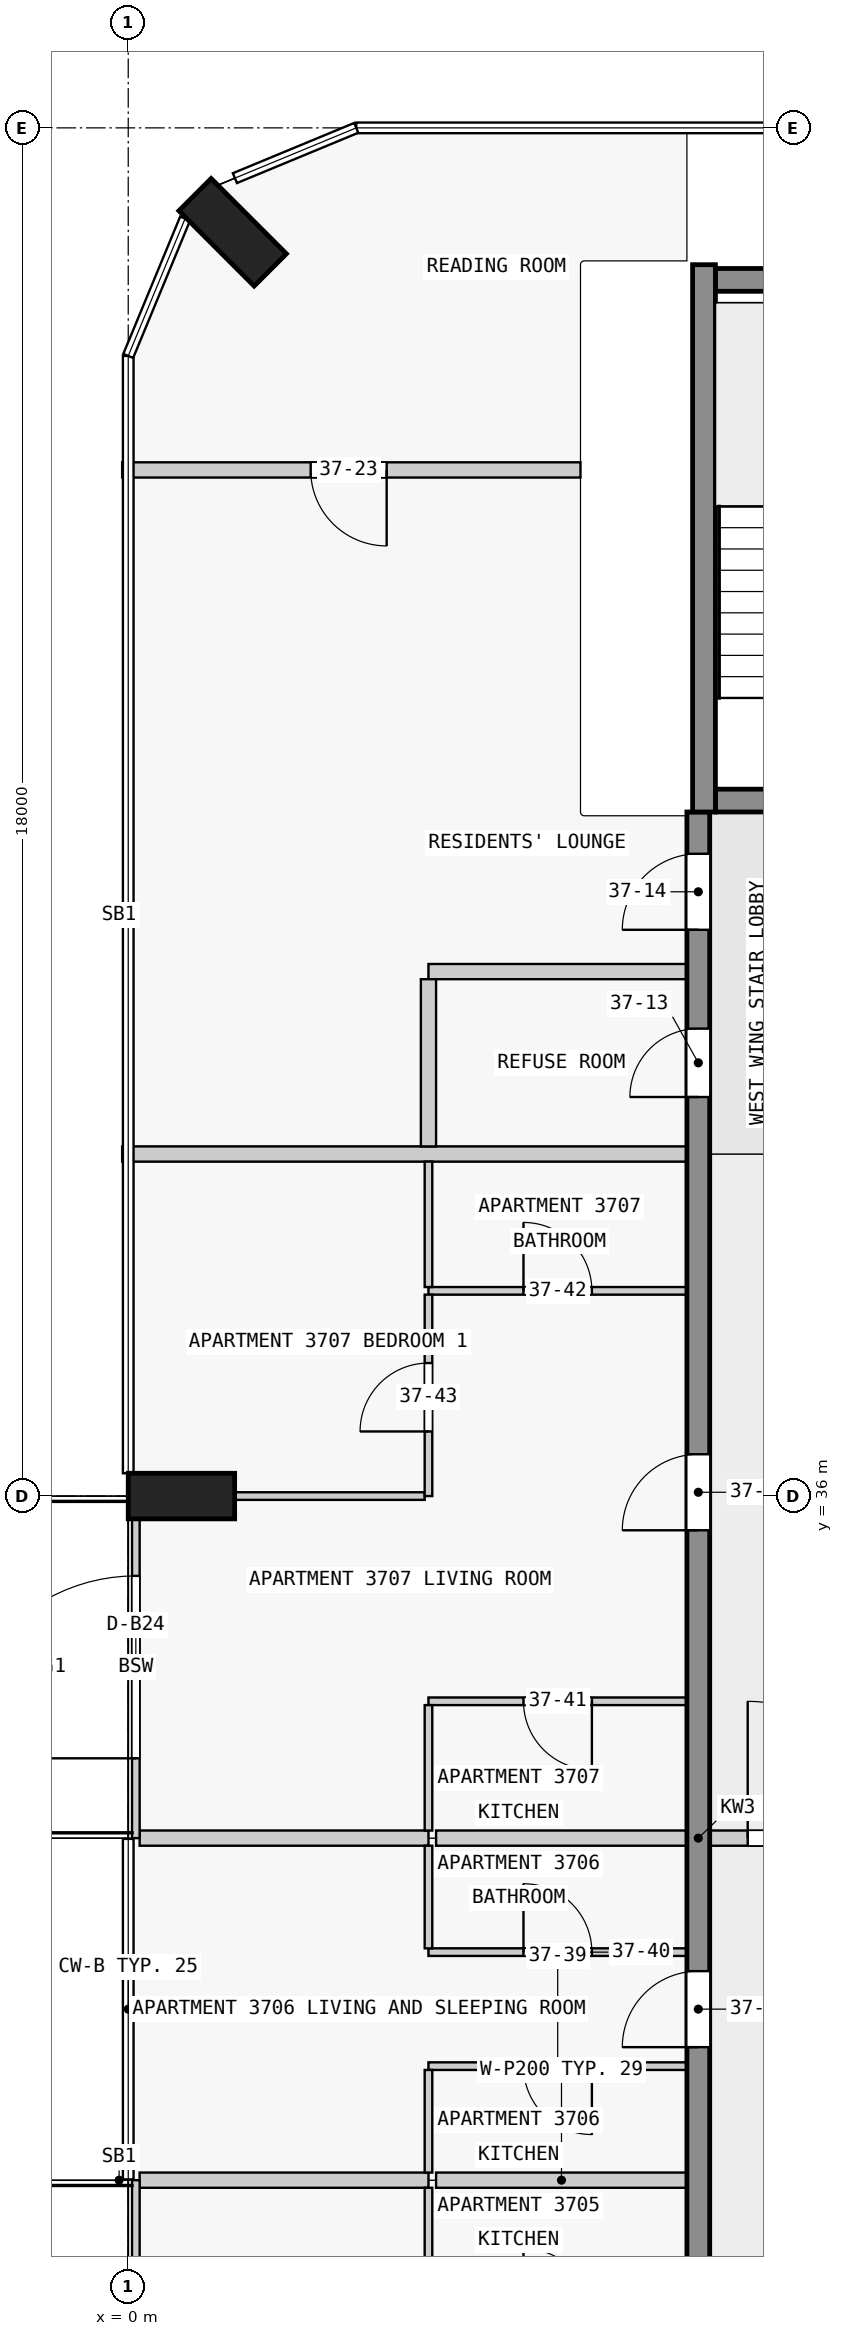
"""IFC4 building model, lengths in metres.
Left out: names, types, materials, properties, quantities, classifications, styles, units other than length and angle.
Written with IfcOpenShell. Run it as: python <this file> out.ifc"""

import sys

from ifc_helpers import new_model, si_unit, direction, frame, frame_2d, origin, origin_2d, place, context, subcontext, project, spatial, rectangle, extrude, element, fill, save


model = new_model("IFC4")
c1 = context("Model", 3, precision=1e-05, world=origin(), true_north=direction((0.0, 1.0)))
c2 = subcontext(c1, "Body", "Model", "MODEL_VIEW")
j1 = project(units=[si_unit("LENGTHUNIT", "METRE"), si_unit("PLANEANGLEUNIT", "RADIAN")], contexts=[c1])
p1 = place(None, origin())
s1 = spatial("IfcSite", under=j1, at=p1, CompositionType="ELEMENT")
p2 = place(p1, origin())
s2 = spatial("IfcBuilding", under=s1, at=p2, CompositionType="ELEMENT")
p3 = place(p2, frame((0.0, 0.0, 146.4)))
s3 = spatial("IfcBuildingStorey", under=s2, at=p3, CompositionType="ELEMENT", Elevation=146.4)
for number, where, z_axis, x_axis in (
    (1, (1.374, 52.626, 0.0), (0.0, 0.0, 1.0), (0.707, 0.707, 0.0)),
    (2, (0.7, 36.0, 0.0), (0.0, 0.0, 1.0), (0.0, 1.0, 0.0)),
):
    element("IfcColumn", number, at=place(p3, frame(where, z_axis=z_axis, x_axis=x_axis)), inside=s3, PredefinedType="COLUMN", context=c2, shape_type="SweptSolid", body=[
        extrude(rectangle(XDim=0.6, YDim=1.4, at=origin_2d()), origin(), (0.0, 0.0, 1.0), 3.5),
    ])
p4 = place(p3, frame((7.725, 45.15, 0.0), z_axis=(0.0, 0.0, 1.0), x_axis=(1.0, 0.0, 0.0)))
e3 = element("IfcWall", 3, at=p4, inside=s3, PredefinedType="SHEAR", context=c2, shape_type="SweptSolid", body=[
    extrude(rectangle(XDim=2.55, YDim=0.3, at=frame_2d((1.275, 0.0))), origin(), (0.0, 0.0, 1.0), 3.5),
])
p5 = place(p4, frame((0.725, 0.0, 0.0)))
e4 = element("IfcOpeningElement", 4, at=p5, cuts=e3, PredefinedType="OPENING", context=c2, shape_type="SweptSolid", body=[
    extrude(rectangle(XDim=1.1, YDim=2.1, at=frame_2d((0.55, 1.05))), frame((0.0, 0.16, 0.0), z_axis=(0.0, -1.0, 0.0), x_axis=(1.0, 0.0, 0.0)), (0.0, 0.0, 1.0), 0.32),
])
p6 = place(p3, frame((7.725, 52.0, 0.0), z_axis=(0.0, 0.0, 1.0), x_axis=(1.0, 0.0, 0.0)))
e5 = element("IfcWall", 5, at=p6, inside=s3, PredefinedType="SHEAR", context=c2, shape_type="SweptSolid", body=[
    extrude(rectangle(XDim=2.55, YDim=0.3, at=frame_2d((1.275, 0.0))), origin(), (0.0, 0.0, 1.0), 3.5),
])
p7 = place(p3, frame((7.575, 45.0, 0.0), z_axis=(0.0, 0.0, 1.0), x_axis=(0.0, 1.0, 0.0)))
e6 = element("IfcWall", 6, at=p7, inside=s3, PredefinedType="SHEAR", context=c2, shape_type="SweptSolid", body=[
    extrude(rectangle(XDim=7.2, YDim=0.3, at=frame_2d((3.6, 0.0))), origin(), (0.0, 0.0, 1.0), 3.5),
])
p8 = place(p3, frame((7.5, 18.0, 0.0), z_axis=(0.0, 0.0, 1.0), x_axis=(0.0, 1.0, 0.0)))
e7 = element("IfcWall", 7, at=p8, inside=s3, PredefinedType="SHEAR", context=c2, shape_type="SweptSolid", body=[
    extrude(rectangle(XDim=27.0, YDim=0.3, at=frame_2d((13.5, 0.0))), origin(), (0.0, 0.0, 1.0), 3.25),
])
p9 = place(p8, frame((4.05, 0.0, 0.0)))
e8 = element("IfcOpeningElement", 8, at=p9, cuts=e7, PredefinedType="OPENING", context=c2, shape_type="SweptSolid", body=[
    extrude(rectangle(XDim=1.0, YDim=2.1, at=frame_2d((0.5, 1.05))), frame((0.0, 0.16, 0.0), z_axis=(0.0, -1.0, 0.0), x_axis=(1.0, 0.0, 0.0)), (0.0, 0.0, 1.0), 0.32),
])
p10 = place(p8, frame((10.75, 0.0, 0.0)))
e9 = element("IfcOpeningElement", 9, at=p10, cuts=e7, PredefinedType="OPENING", context=c2, shape_type="SweptSolid", body=[
    extrude(rectangle(XDim=1.0, YDim=2.1, at=frame_2d((0.5, 1.05))), frame((0.0, 0.16, 0.0), z_axis=(0.0, -1.0, 0.0), x_axis=(1.0, 0.0, 0.0)), (0.0, 0.0, 1.0), 0.32),
])
p11 = place(p8, frame((17.55, 0.0, 0.0)))
e10 = element("IfcOpeningElement", 10, at=p11, cuts=e7, PredefinedType="OPENING", context=c2, shape_type="SweptSolid", body=[
    extrude(rectangle(XDim=1.0, YDim=2.1, at=frame_2d((0.5, 1.05))), frame((0.0, 0.16, 0.0), z_axis=(0.0, -1.0, 0.0), x_axis=(1.0, 0.0, 0.0)), (0.0, 0.0, 1.0), 0.32),
])
p12 = place(p8, frame((23.25, 0.0, 0.0)))
e11 = element("IfcOpeningElement", 11, at=p12, cuts=e7, PredefinedType="OPENING", context=c2, shape_type="SweptSolid", body=[
    extrude(rectangle(XDim=0.9, YDim=2.1, at=frame_2d((0.45, 1.05))), frame((0.0, 0.16, 0.0), z_axis=(0.0, -1.0, 0.0), x_axis=(1.0, 0.0, 0.0)), (0.0, 0.0, 1.0), 0.32),
])
p13 = place(p8, frame((25.45, 0.0, 0.0)))
e12 = element("IfcOpeningElement", 12, at=p13, cuts=e7, PredefinedType="OPENING", context=c2, shape_type="SweptSolid", body=[
    extrude(rectangle(XDim=1.0, YDim=2.1, at=frame_2d((0.5, 1.05))), frame((0.0, 0.16, 0.0), z_axis=(0.0, -1.0, 0.0), x_axis=(1.0, 0.0, 0.0)), (0.0, 0.0, 1.0), 0.32),
])
p14 = place(p3, frame((0.1, 22.5, 0.0), z_axis=(0.0, 0.0, 1.0), x_axis=(0.0, 1.0, 0.0)))
e13 = element("IfcWall", 13, at=p14, inside=s3, PredefinedType="STANDARD", context=c2, shape_type="SweptSolid", body=[
    extrude(rectangle(XDim=4.5, YDim=0.1, at=frame_2d((2.25, 0.0))), origin(), (0.0, 0.0, 1.0), 3.25),
])
p15 = place(p14, frame((1.05, 0.0, 0.0)))
e14 = element("IfcOpeningElement", 14, at=p15, cuts=e13, PredefinedType="OPENING", context=c2, shape_type="SweptSolid", body=[
    extrude(rectangle(XDim=2.4, YDim=2.4, at=frame_2d((1.2, 1.2))), frame((0.0, 0.06, 0.0), z_axis=(0.0, -1.0, 0.0), x_axis=(1.0, 0.0, 0.0)), (0.0, 0.0, 1.0), 0.12),
])
p16 = place(p3, frame((0.1, 31.5, 0.0), z_axis=(0.0, 0.0, 1.0), x_axis=(0.0, 1.0, 0.0)))
e15 = element("IfcWall", 15, at=p16, inside=s3, PredefinedType="STANDARD", context=c2, shape_type="SweptSolid", body=[
    extrude(rectangle(XDim=4.5, YDim=0.1, at=frame_2d((2.25, 0.0))), origin(), (0.0, 0.0, 1.0), 3.25),
])
p17 = place(p16, frame((1.05, 0.0, 0.0)))
e16 = element("IfcOpeningElement", 16, at=p17, cuts=e15, PredefinedType="OPENING", context=c2, shape_type="SweptSolid", body=[
    extrude(rectangle(XDim=2.4, YDim=2.4, at=frame_2d((1.2, 1.2))), frame((0.0, 0.06, 0.0), z_axis=(0.0, -1.0, 0.0), x_axis=(1.0, 0.0, 0.0)), (0.0, 0.0, 1.0), 0.12),
])
p18 = place(p3, frame((7.35, 27.0, 0.0), z_axis=(0.0, 0.0, 1.0), x_axis=(-1.0, 0.0, 0.0)))
e17 = element("IfcWall", 17, at=p18, inside=s3, PredefinedType="PARTITIONING", context=c2, shape_type="SweptSolid", body=[
    extrude(rectangle(XDim=3.3, YDim=0.2, at=frame_2d((1.65, 0.0))), origin(), (0.0, 0.0, 1.0), 3.25),
])
p19 = place(p3, frame((0.15, 27.0, 0.0), z_axis=(0.0, 0.0, 1.0), x_axis=(1.0, 0.0, 0.0)))
e18 = element("IfcWall", 18, at=p19, inside=s3, PredefinedType="PARTITIONING", context=c2, shape_type="SweptSolid", body=[
    extrude(rectangle(XDim=3.8, YDim=0.2, at=frame_2d((1.9, 0.0))), origin(), (0.0, 0.0, 1.0), 3.25),
])
p20 = place(p3, frame((7.35, 28.5, 0.0), z_axis=(0.0, 0.0, 1.0), x_axis=(-1.0, 0.0, 0.0)))
e19 = element("IfcWall", 19, at=p20, inside=s3, PredefinedType="PARTITIONING", context=c2, shape_type="SweptSolid", body=[
    extrude(rectangle(XDim=3.4, YDim=0.1, at=frame_2d((1.7, 0.0))), origin(), (0.0, 0.0, 1.0), 3.25),
])
p21 = place(p20, frame((1.25, 0.0, 0.0)))
e20 = element("IfcOpeningElement", 20, at=p21, cuts=e19, PredefinedType="OPENING", context=c2, shape_type="SweptSolid", body=[
    extrude(rectangle(XDim=0.9, YDim=2.1, at=frame_2d((0.45, 1.05))), frame((0.0, 0.06, 0.0), z_axis=(0.0, -1.0, 0.0), x_axis=(1.0, 0.0, 0.0)), (0.0, 0.0, 1.0), 0.12),
])
p22 = place(p3, frame((3.95, 30.0, 0.0), z_axis=(0.0, 0.0, 1.0), x_axis=(1.0, 0.0, 0.0)))
e21 = element("IfcWall", 21, at=p22, inside=s3, PredefinedType="PARTITIONING", context=c2, shape_type="SweptSolid", body=[
    extrude(rectangle(XDim=3.4, YDim=0.1, at=frame_2d((1.7, 0.0))), origin(), (0.0, 0.0, 1.0), 3.25),
])
p23 = place(p22, frame((1.25, 0.0, 0.0)))
e22 = element("IfcOpeningElement", 22, at=p23, cuts=e21, PredefinedType="OPENING", context=c2, shape_type="SweptSolid", body=[
    extrude(rectangle(XDim=0.9, YDim=2.1, at=frame_2d((0.45, 1.05))), frame((0.0, 0.06, 0.0), z_axis=(0.0, -1.0, 0.0), x_axis=(1.0, 0.0, 0.0)), (0.0, 0.0, 1.0), 0.12),
])
p24 = place(p3, frame((7.35, 31.5, 0.0), z_axis=(0.0, 0.0, 1.0), x_axis=(-1.0, 0.0, 0.0)))
e23 = element("IfcWall", 23, at=p24, inside=s3, PredefinedType="PARTITIONING", context=c2, shape_type="SweptSolid", body=[
    extrude(rectangle(XDim=3.3, YDim=0.2, at=frame_2d((1.65, 0.0))), origin(), (0.0, 0.0, 1.0), 3.25),
])
p25 = place(p3, frame((0.15, 31.5, 0.0), z_axis=(0.0, 0.0, 1.0), x_axis=(1.0, 0.0, 0.0)))
e24 = element("IfcWall", 24, at=p25, inside=s3, PredefinedType="PARTITIONING", context=c2, shape_type="SweptSolid", body=[
    extrude(rectangle(XDim=3.8, YDim=0.2, at=frame_2d((1.9, 0.0))), origin(), (0.0, 0.0, 1.0), 3.25),
])
p26 = place(p3, frame((7.35, 33.3, 0.0), z_axis=(0.0, 0.0, 1.0), x_axis=(-1.0, 0.0, 0.0)))
e25 = element("IfcWall", 25, at=p26, inside=s3, PredefinedType="PARTITIONING", context=c2, shape_type="SweptSolid", body=[
    extrude(rectangle(XDim=3.4, YDim=0.1, at=frame_2d((1.7, 0.0))), origin(), (0.0, 0.0, 1.0), 3.25),
])
p27 = place(p26, frame((1.25, 0.0, 0.0)))
e26 = element("IfcOpeningElement", 26, at=p27, cuts=e25, PredefinedType="OPENING", context=c2, shape_type="SweptSolid", body=[
    extrude(rectangle(XDim=0.9, YDim=2.1, at=frame_2d((0.45, 1.05))), frame((0.0, 0.06, 0.0), z_axis=(0.0, -1.0, 0.0), x_axis=(1.0, 0.0, 0.0)), (0.0, 0.0, 1.0), 0.12),
])
p28 = place(p3, frame((1.4, 36.0, 0.0), z_axis=(0.0, 0.0, 1.0), x_axis=(1.0, 0.0, 0.0)))
e27 = element("IfcWall", 27, at=p28, inside=s3, PredefinedType="PARTITIONING", context=c2, shape_type="SweptSolid", body=[
    extrude(rectangle(XDim=2.5, YDim=0.1, at=frame_2d((1.25, 0.0))), origin(), (0.0, 0.0, 1.0), 3.25),
])
p29 = place(p3, frame((3.95, 38.7, 0.0), z_axis=(0.0, 0.0, 1.0), x_axis=(1.0, 0.0, 0.0)))
e28 = element("IfcWall", 28, at=p29, inside=s3, PredefinedType="PARTITIONING", context=c2, shape_type="SweptSolid", body=[
    extrude(rectangle(XDim=3.4, YDim=0.1, at=frame_2d((1.7, 0.0))), origin(), (0.0, 0.0, 1.0), 3.25),
])
p30 = place(p29, frame((1.25, 0.0, 0.0)))
e29 = element("IfcOpeningElement", 29, at=p30, cuts=e28, PredefinedType="OPENING", context=c2, shape_type="SweptSolid", body=[
    extrude(rectangle(XDim=0.9, YDim=2.1, at=frame_2d((0.45, 1.05))), frame((0.0, 0.06, 0.0), z_axis=(0.0, -1.0, 0.0), x_axis=(1.0, 0.0, 0.0)), (0.0, 0.0, 1.0), 0.12),
])
p31 = place(p3, frame((7.35, 40.5, 0.0), z_axis=(0.0, 0.0, 1.0), x_axis=(-1.0, 0.0, 0.0)))
e30 = element("IfcWall", 30, at=p31, inside=s3, PredefinedType="PARTITIONING", context=c2, shape_type="SweptSolid", body=[
    extrude(rectangle(XDim=7.43, YDim=0.2, at=frame_2d((3.715, 0.0))), origin(), (0.0, 0.0, 1.0), 3.25),
])
p32 = place(p3, frame((7.35, 42.9, 0.0), z_axis=(0.0, 0.0, 1.0), x_axis=(-1.0, 0.0, 0.0)))
e31 = element("IfcWall", 31, at=p32, inside=s3, PredefinedType="PARTITIONING", context=c2, shape_type="SweptSolid", body=[
    extrude(rectangle(XDim=3.4, YDim=0.2, at=frame_2d((1.7, 0.0))), origin(), (0.0, 0.0, 1.0), 3.25),
])
p33 = place(p3, frame((5.95, 49.5, 0.0), z_axis=(0.0, 0.0, 1.0), x_axis=(-1.0, 0.0, 0.0)))
e32 = element("IfcWall", 32, at=p33, inside=s3, PredefinedType="PARTITIONING", context=c2, shape_type="SweptSolid", body=[
    extrude(rectangle(XDim=6.03, YDim=0.2, at=frame_2d((3.015, 0.0))), origin(), (0.0, 0.0, 1.0), 3.25),
])
p34 = place(p33, frame((2.55, 0.0, 0.0)))
e33 = element("IfcOpeningElement", 33, at=p34, cuts=e32, PredefinedType="OPENING", context=c2, shape_type="SweptSolid", body=[
    extrude(rectangle(XDim=1.0, YDim=2.1, at=frame_2d((0.5, 1.05))), frame((0.0, 0.11, 0.0), z_axis=(0.0, -1.0, 0.0), x_axis=(1.0, 0.0, 0.0)), (0.0, 0.0, 1.0), 0.22),
])
p35 = place(p3, frame((3.95, 26.9, 0.0), z_axis=(0.0, 0.0, 1.0), x_axis=(0.0, -1.0, 0.0)))
e34 = element("IfcWall", 34, at=p35, inside=s3, PredefinedType="PARTITIONING", context=c2, shape_type="SweptSolid", body=[
    extrude(rectangle(XDim=1.65, YDim=0.1, at=frame_2d((0.825, 0.0))), origin(), (0.0, 0.0, 1.0), 3.25),
])
for number, where, z_axis, x_axis in (
    (35, (3.95, 28.45, 0.0), (0.0, 0.0, 1.0), (0.0, -1.0, 0.0)),
    (36, (3.95, 31.4, 0.0), (0.0, 0.0, 1.0), (0.0, -1.0, 0.0)),
):
    element("IfcWall", number, at=place(p3, frame(where, z_axis=z_axis, x_axis=x_axis)), inside=s3, PredefinedType="PARTITIONING", context=c2, shape_type="SweptSolid", body=[
        extrude(rectangle(XDim=1.35, YDim=0.1, at=frame_2d((0.675, 0.0))), origin(), (0.0, 0.0, 1.0), 3.25),
    ])
for number, where, z_axis, x_axis in (
    (37, (3.95, 33.25, 0.0), (0.0, 0.0, 1.0), (0.0, -1.0, 0.0)),
    (38, (3.95, 40.4, 0.0), (0.0, 0.0, 1.0), (0.0, -1.0, 0.0)),
):
    element("IfcWall", number, at=place(p3, frame(where, z_axis=z_axis, x_axis=x_axis)), inside=s3, PredefinedType="PARTITIONING", context=c2, shape_type="SweptSolid", body=[
        extrude(rectangle(XDim=1.65, YDim=0.1, at=frame_2d((0.825, 0.0))), origin(), (0.0, 0.0, 1.0), 3.25),
    ])
p36 = place(p3, frame((3.95, 36.0, 0.0), z_axis=(0.0, 0.0, 1.0), x_axis=(0.0, 1.0, 0.0)))
e39 = element("IfcWall", 39, at=p36, inside=s3, PredefinedType="PARTITIONING", context=c2, shape_type="SweptSolid", body=[
    extrude(rectangle(XDim=2.65, YDim=0.1, at=frame_2d((1.325, 0.0))), origin(), (0.0, 0.0, 1.0), 3.25),
])
p37 = place(p36, frame((0.85, 0.0, 0.0)))
e40 = element("IfcOpeningElement", 40, at=p37, cuts=e39, PredefinedType="OPENING", context=c2, shape_type="SweptSolid", body=[
    extrude(rectangle(XDim=0.9, YDim=2.1, at=frame_2d((0.45, 1.05))), frame((0.0, 0.06, 0.0), z_axis=(0.0, -1.0, 0.0), x_axis=(1.0, 0.0, 0.0)), (0.0, 0.0, 1.0), 0.12),
])
p38 = place(p3, frame((3.95, 42.8, 0.0), z_axis=(0.0, 0.0, 1.0), x_axis=(0.0, -1.0, 0.0)))
e41 = element("IfcWall", 41, at=p38, inside=s3, PredefinedType="PARTITIONING", context=c2, shape_type="SweptSolid", body=[
    extrude(rectangle(XDim=2.2, YDim=0.2, at=frame_2d((1.1, 0.0))), origin(), (0.0, 0.0, 1.0), 3.25),
])
p39 = place(p3, frame((7.45, 31.5, 0.0), z_axis=(0.0, 0.0, 1.0), x_axis=(1.0, 0.0, 0.0)))
e42 = element("IfcWall", 42, at=p39, inside=s3, PredefinedType="PARTITIONING", context=c2, shape_type="SweptSolid", body=[
    extrude(rectangle(XDim=3.1, YDim=0.2, at=frame_2d((1.55, 0.0))), origin(), (0.0, 0.0, 1.0), 3.25),
])
p40 = place(p39, frame((0.7, 0.0, 0.0)))
e43 = element("IfcOpeningElement", 43, at=p40, cuts=e42, PredefinedType="OPENING", context=c2, shape_type="SweptSolid", body=[
    extrude(rectangle(XDim=1.8, YDim=2.1, at=frame_2d((0.9, 1.05))), frame((0.0, 0.11, 0.0), z_axis=(0.0, -1.0, 0.0), x_axis=(1.0, 0.0, 0.0)), (0.0, 0.0, 1.0), 0.22),
])
p41 = place(p17, origin())
e44 = element("IfcDoor", 44, at=p41, inside=s3, OperationType="SINGLE_SWING_LEFT", PredefinedType="DOOR", context=c2, shape_type="SweptSolid", body=[
    extrude(rectangle(XDim=2.4, YDim=2.4, at=frame_2d((1.2, 1.2))), frame((0.0, 0.025, 0.0), z_axis=(0.0, -1.0, 0.0), x_axis=(1.0, 0.0, 0.0)), (0.0, 0.0, 1.0), 0.05),
])
fill(e16, e44)
p42 = place(p10, origin())
e45 = element("IfcDoor", 45, at=p42, inside=s3, OperationType="SINGLE_SWING_LEFT", PredefinedType="DOOR", context=c2, shape_type="SweptSolid", body=[
    extrude(rectangle(XDim=1.0, YDim=2.1, at=frame_2d((0.5, 1.05))), frame((0.0, 0.025, 0.0), z_axis=(0.0, -1.0, 0.0), x_axis=(1.0, 0.0, 0.0)), (0.0, 0.0, 1.0), 0.05),
])
fill(e9, e45)
p43 = place(p11, origin())
e46 = element("IfcDoor", 46, at=p43, inside=s3, OperationType="SINGLE_SWING_RIGHT", PredefinedType="DOOR", context=c2, shape_type="SweptSolid", body=[
    extrude(rectangle(XDim=1.0, YDim=2.1, at=frame_2d((0.5, 1.05))), frame((0.0, 0.025, 0.0), z_axis=(0.0, -1.0, 0.0), x_axis=(1.0, 0.0, 0.0)), (0.0, 0.0, 1.0), 0.05),
])
fill(e10, e46)
p44 = place(p12, origin())
e47 = element("IfcDoor", 47, at=p44, inside=s3, OperationType="SINGLE_SWING_RIGHT", PredefinedType="DOOR", context=c2, shape_type="SweptSolid", body=[
    extrude(rectangle(XDim=0.9, YDim=2.1, at=frame_2d((0.45, 1.05))), frame((0.0, 0.025, 0.0), z_axis=(0.0, -1.0, 0.0), x_axis=(1.0, 0.0, 0.0)), (0.0, 0.0, 1.0), 0.05),
])
fill(e11, e47)
p45 = place(p13, origin())
e48 = element("IfcDoor", 48, at=p45, inside=s3, OperationType="SINGLE_SWING_RIGHT", PredefinedType="DOOR", context=c2, shape_type="SweptSolid", body=[
    extrude(rectangle(XDim=1.0, YDim=2.1, at=frame_2d((0.5, 1.05))), frame((0.0, 0.025, 0.0), z_axis=(0.0, -1.0, 0.0), x_axis=(1.0, 0.0, 0.0)), (0.0, 0.0, 1.0), 0.05),
])
fill(e12, e48)
p46 = place(p40, origin())
e49 = element("IfcDoor", 49, at=p46, inside=s3, OperationType="SINGLE_SWING_RIGHT", PredefinedType="DOOR", context=c2, shape_type="SweptSolid", body=[
    extrude(rectangle(XDim=1.8, YDim=2.1, at=frame_2d((0.9, 1.05))), frame((0.0, 0.025, 0.0), z_axis=(0.0, -1.0, 0.0), x_axis=(1.0, 0.0, 0.0)), (0.0, 0.0, 1.0), 0.05),
])
fill(e43, e49)
p47 = place(p34, origin())
e50 = element("IfcDoor", 50, at=p47, inside=s3, OperationType="SINGLE_SWING_RIGHT", PredefinedType="DOOR", context=c2, shape_type="SweptSolid", body=[
    extrude(rectangle(XDim=1.0, YDim=2.1, at=frame_2d((0.5, 1.05))), frame((0.0, 0.025, 0.0), z_axis=(0.0, -1.0, 0.0), x_axis=(1.0, 0.0, 0.0)), (0.0, 0.0, 1.0), 0.05),
])
fill(e33, e50)
p48 = place(p21, origin())
e51 = element("IfcDoor", 51, at=p48, inside=s3, OperationType="SINGLE_SWING_RIGHT", PredefinedType="DOOR", context=c2, shape_type="SweptSolid", body=[
    extrude(rectangle(XDim=0.9, YDim=2.1, at=frame_2d((0.45, 1.05))), frame((0.0, 0.025, 0.0), z_axis=(0.0, -1.0, 0.0), x_axis=(1.0, 0.0, 0.0)), (0.0, 0.0, 1.0), 0.05),
])
fill(e20, e51)
p49 = place(p23, origin())
e52 = element("IfcDoor", 52, at=p49, inside=s3, OperationType="SINGLE_SWING_RIGHT", PredefinedType="DOOR", context=c2, shape_type="SweptSolid", body=[
    extrude(rectangle(XDim=0.9, YDim=2.1, at=frame_2d((0.45, 1.05))), frame((0.0, 0.025, 0.0), z_axis=(0.0, -1.0, 0.0), x_axis=(1.0, 0.0, 0.0)), (0.0, 0.0, 1.0), 0.05),
])
fill(e22, e52)
p50 = place(p27, origin())
e53 = element("IfcDoor", 53, at=p50, inside=s3, OperationType="SINGLE_SWING_RIGHT", PredefinedType="DOOR", context=c2, shape_type="SweptSolid", body=[
    extrude(rectangle(XDim=0.9, YDim=2.1, at=frame_2d((0.45, 1.05))), frame((0.0, 0.025, 0.0), z_axis=(0.0, -1.0, 0.0), x_axis=(1.0, 0.0, 0.0)), (0.0, 0.0, 1.0), 0.05),
])
fill(e26, e53)
p51 = place(p30, origin())
e54 = element("IfcDoor", 54, at=p51, inside=s3, OperationType="SINGLE_SWING_RIGHT", PredefinedType="DOOR", context=c2, shape_type="SweptSolid", body=[
    extrude(rectangle(XDim=0.9, YDim=2.1, at=frame_2d((0.45, 1.05))), frame((0.0, 0.025, 0.0), z_axis=(0.0, -1.0, 0.0), x_axis=(1.0, 0.0, 0.0)), (0.0, 0.0, 1.0), 0.05),
])
fill(e29, e54)
p52 = place(p37, origin())
e55 = element("IfcDoor", 55, at=p52, inside=s3, OperationType="SINGLE_SWING_LEFT", PredefinedType="DOOR", context=c2, shape_type="SweptSolid", body=[
    extrude(rectangle(XDim=0.9, YDim=2.1, at=frame_2d((0.45, 1.05))), frame((0.0, 0.025, 0.0), z_axis=(0.0, -1.0, 0.0), x_axis=(1.0, 0.0, 0.0)), (0.0, 0.0, 1.0), 0.05),
])
fill(e40, e55)
save(model, sys.argv[1])
